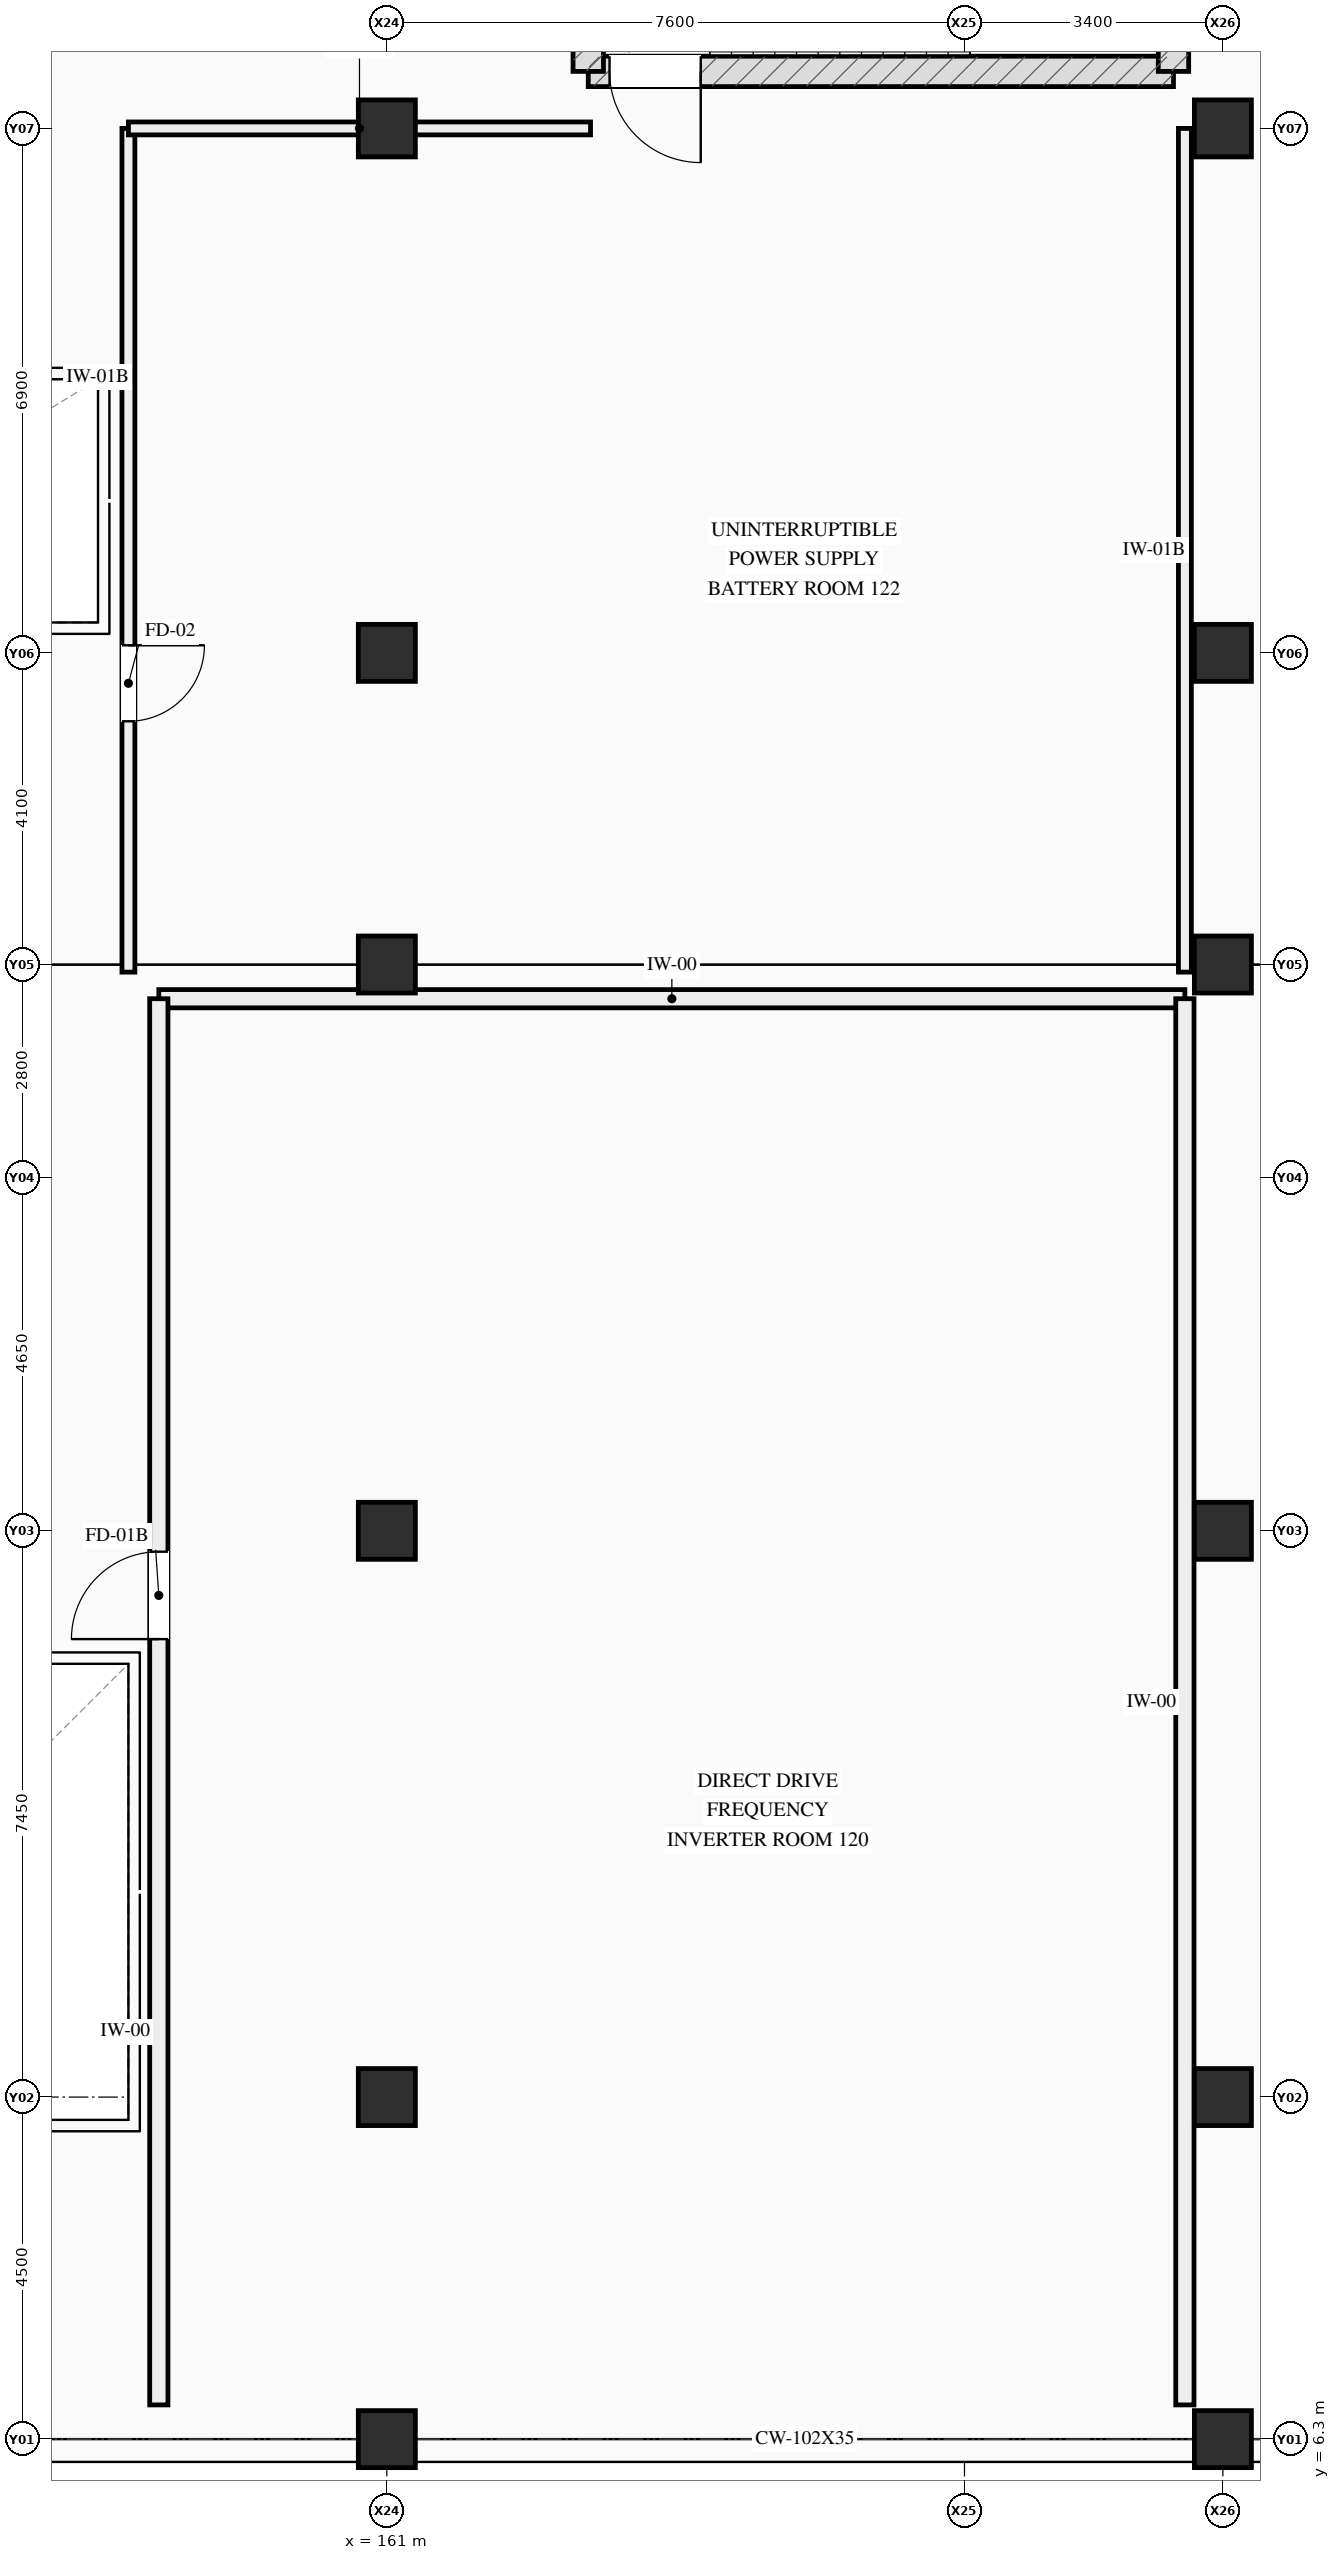
"""IFC4 building model, lengths in metres.
Left out: names, types, materials, properties, quantities, classifications, styles, units other than length and angle.
Written with IfcOpenShell. Run it as: python <this file> out.ifc"""

import sys

from ifc_helpers import new_model, si_unit, direction, frame, frame_2d, origin, origin_2d, place, context, subcontext, project, spatial, rectangle, extrude, element, fill, save


model = new_model("IFC4")
c1 = context("Model", 3, precision=1e-05, world=origin(), true_north=direction((0.0, 1.0)))
c2 = subcontext(c1, "Body", "Model", "MODEL_VIEW")
j1 = project(units=[si_unit("LENGTHUNIT", "METRE"), si_unit("PLANEANGLEUNIT", "RADIAN")], contexts=[c1])
p1 = place(None, origin())
s1 = spatial("IfcSite", under=j1, at=p1, CompositionType="ELEMENT")
p2 = place(p1, origin())
s2 = spatial("IfcBuilding", under=s1, at=p2, CompositionType="ELEMENT")
p3 = place(p2, frame((0.0, 0.0, 4.5)))
s3 = spatial("IfcBuildingStorey", under=s2, at=p3, CompositionType="ELEMENT", Elevation=4.5)
for number, where, z_axis, x_axis in (
    (1, (161.0, 6.3, 0.0), (0.0, 0.0, 1.0), (1.0, 0.0, 0.0)),
    (2, (161.0, 10.8, 0.0), (0.0, 0.0, 1.0), (1.0, 0.0, 0.0)),
    (3, (161.0, 18.25, 0.0), (0.0, 0.0, 1.0), (1.0, 0.0, 0.0)),
    (4, (161.0, 25.7, 0.0), (0.0, 0.0, 1.0), (1.0, 0.0, 0.0)),
    (5, (161.0, 29.8, 0.0), (0.0, 0.0, 1.0), (1.0, 0.0, 0.0)),
    (6, (161.0, 36.7, 0.0), (0.0, 0.0, 1.0), (1.0, 0.0, 0.0)),
    (7, (172.0, 6.3, 0.0), (0.0, 0.0, 1.0), (1.0, 0.0, 0.0)),
    (8, (172.0, 10.8, 0.0), (0.0, 0.0, 1.0), (1.0, 0.0, 0.0)),
    (9, (172.0, 18.25, 0.0), (0.0, 0.0, 1.0), (1.0, 0.0, 0.0)),
    (10, (172.0, 25.7, 0.0), (0.0, 0.0, 1.0), (1.0, 0.0, 0.0)),
    (11, (172.0, 29.8, 0.0), (0.0, 0.0, 1.0), (1.0, 0.0, 0.0)),
    (12, (172.0, 36.7, 0.0), (0.0, 0.0, 1.0), (1.0, 0.0, 0.0)),
):
    element("IfcColumn", number, at=place(p3, frame(where, z_axis=z_axis, x_axis=x_axis)), inside=s3, PredefinedType="COLUMN", context=c2, shape_type="SweptSolid", body=[
        extrude(rectangle(XDim=0.75, YDim=0.75, at=origin_2d()), origin(), (0.0, 0.0, 1.0), 4.5),
    ])
p4 = place(p3, frame((163.65, 37.45, 0.0), z_axis=(0.0, 0.0, 1.0), x_axis=(1.0, 0.0, 0.0)))
e13 = element("IfcWall", 13, at=p4, inside=s3, PredefinedType="SHEAR", context=c2, shape_type="SweptSolid", body=[
    extrude(rectangle(XDim=7.7, YDim=0.4, at=frame_2d((3.85, 0.0))), origin(), (0.0, 0.0, 1.0), 4.2),
])
p5 = place(p4, frame((0.28, 0.0, 0.0)))
e14 = element("IfcOpeningElement", 14, at=p5, cuts=e13, PredefinedType="OPENING", context=c2, shape_type="SweptSolid", body=[
    extrude(rectangle(XDim=1.2, YDim=2.2, at=frame_2d((0.6, 1.1))), frame((0.0, 0.21, 0.0), z_axis=(0.0, -1.0, 0.0), x_axis=(1.0, 0.0, 0.0)), (0.0, 0.0, 1.0), 0.42),
])
for number, where, z_axis, x_axis in (
    (15, (163.65, 41.1, 0.0), (0.0, 0.0, 1.0), (0.0, -1.0, 0.0)),
    (16, (171.35, 37.45, 0.0), (0.0, 0.0, 1.0), (0.0, 1.0, 0.0)),
):
    element("IfcWall", number, at=place(p3, frame(where, z_axis=z_axis, x_axis=x_axis)), inside=s3, PredefinedType="SHEAR", context=c2, shape_type="SweptSolid", body=[
        extrude(rectangle(XDim=3.65, YDim=0.4, at=frame_2d((1.825, 0.0))), origin(), (0.0, 0.0, 1.0), 4.2),
    ])
p6 = place(p3, frame((158.0, 25.25, 0.0), z_axis=(0.0, 0.0, 1.0), x_axis=(1.0, 0.0, 0.0)))
e17 = element("IfcWall", 17, at=p6, inside=s3, PredefinedType="SOLIDWALL", context=c2, shape_type="SweptSolid", body=[
    extrude(rectangle(XDim=13.5, YDim=0.24, at=frame_2d((6.75, 0.0))), origin(), (0.0, 0.0, 1.0), 3.3),
])
p7 = place(p3, frame((158.0, 6.75, 0.0), z_axis=(0.0, 0.0, 1.0), x_axis=(0.0, 1.0, 0.0)))
e18 = element("IfcWall", 18, at=p7, inside=s3, PredefinedType="SOLIDWALL", context=c2, shape_type="SweptSolid", body=[
    extrude(rectangle(XDim=18.5, YDim=0.24, at=frame_2d((9.25, 0.0))), origin(), (0.0, 0.0, 1.0), 3.3),
])
p8 = place(p7, frame((10.075, 0.0, 0.0)))
e19 = element("IfcOpeningElement", 19, at=p8, cuts=e18, PredefinedType="OPENING", context=c2, shape_type="SweptSolid", body=[
    extrude(rectangle(XDim=1.15, YDim=2.2, at=frame_2d((0.575, 1.1))), frame((0.0, 0.13, 0.0), z_axis=(0.0, -1.0, 0.0), x_axis=(1.0, 0.0, 0.0)), (0.0, 0.0, 1.0), 0.26),
])
p9 = place(p3, frame((171.5, 6.75, 0.0), z_axis=(0.0, 0.0, 1.0), x_axis=(0.0, 1.0, 0.0)))
e20 = element("IfcWall", 20, at=p9, inside=s3, PredefinedType="SOLIDWALL", context=c2, shape_type="SweptSolid", body=[
    extrude(rectangle(XDim=18.5, YDim=0.24, at=frame_2d((9.25, 0.0))), origin(), (0.0, 0.0, 1.0), 3.3),
])
p10 = place(p3, frame((157.6, 25.6, 0.0), z_axis=(0.0, 0.0, 1.0), x_axis=(0.0, 1.0, 0.0)))
e21 = element("IfcWall", 21, at=p10, inside=s3, PredefinedType="SOLIDWALL", context=c2, shape_type="SweptSolid", body=[
    extrude(rectangle(XDim=11.1, YDim=0.17, at=frame_2d((5.55, 0.0))), origin(), (0.0, 0.0, 1.0), 3.3),
])
p11 = place(p10, frame((3.3, 0.0, 0.0)))
e22 = element("IfcOpeningElement", 22, at=p11, cuts=e21, PredefinedType="OPENING", context=c2, shape_type="SweptSolid", body=[
    extrude(rectangle(XDim=1.0, YDim=2.15, at=frame_2d((0.5, 1.075))), frame((0.0, 0.095, 0.0), z_axis=(0.0, -1.0, 0.0), x_axis=(1.0, 0.0, 0.0)), (0.0, 0.0, 1.0), 0.19),
])
p12 = place(p3, frame((171.5, 25.6, 0.0), z_axis=(0.0, 0.0, 1.0), x_axis=(0.0, 1.0, 0.0)))
e23 = element("IfcWall", 23, at=p12, inside=s3, PredefinedType="SOLIDWALL", context=c2, shape_type="SweptSolid", body=[
    extrude(rectangle(XDim=11.1, YDim=0.17, at=frame_2d((5.55, 0.0))), origin(), (0.0, 0.0, 1.0), 3.3),
])
p13 = place(p3, frame((157.6, 36.7, 0.0), z_axis=(0.0, 0.0, 1.0), x_axis=(1.0, 0.0, 0.0)))
e24 = element("IfcWall", 24, at=p13, inside=s3, PredefinedType="SOLIDWALL", context=c2, shape_type="SweptSolid", body=[
    extrude(rectangle(XDim=6.08, YDim=0.17, at=frame_2d((3.04, 0.0))), origin(), (0.0, 0.0, 1.0), 3.3),
])
p14 = place(p5, origin())
e25 = element("IfcDoor", 25, at=p14, inside=s3, OperationType="SINGLE_SWING_RIGHT", PredefinedType="DOOR", context=c2, shape_type="SweptSolid", body=[
    extrude(rectangle(XDim=1.2, YDim=2.2, at=frame_2d((0.6, 1.1))), frame((0.0, 0.025, 0.0), z_axis=(0.0, -1.0, 0.0), x_axis=(1.0, 0.0, 0.0)), (0.0, 0.0, 1.0), 0.05),
])
fill(e14, e25)
p15 = place(p8, origin())
e26 = element("IfcDoor", 26, at=p15, inside=s3, OperationType="SINGLE_SWING_LEFT", PredefinedType="DOOR", context=c2, shape_type="SweptSolid", body=[
    extrude(rectangle(XDim=1.15, YDim=2.2, at=frame_2d((0.575, 1.1))), frame((0.0, 0.025, 0.0), z_axis=(0.0, -1.0, 0.0), x_axis=(1.0, 0.0, 0.0)), (0.0, 0.0, 1.0), 0.05),
])
fill(e19, e26)
p16 = place(p11, origin())
e27 = element("IfcDoor", 27, at=p16, inside=s3, OperationType="SINGLE_SWING_RIGHT", PredefinedType="DOOR", context=c2, shape_type="SweptSolid", body=[
    extrude(rectangle(XDim=1.0, YDim=2.15, at=frame_2d((0.5, 1.075))), frame((0.0, 0.025, 0.0), z_axis=(0.0, -1.0, 0.0), x_axis=(1.0, 0.0, 0.0)), (0.0, 0.0, 1.0), 0.05),
])
fill(e22, e27)
save(model, sys.argv[1])
